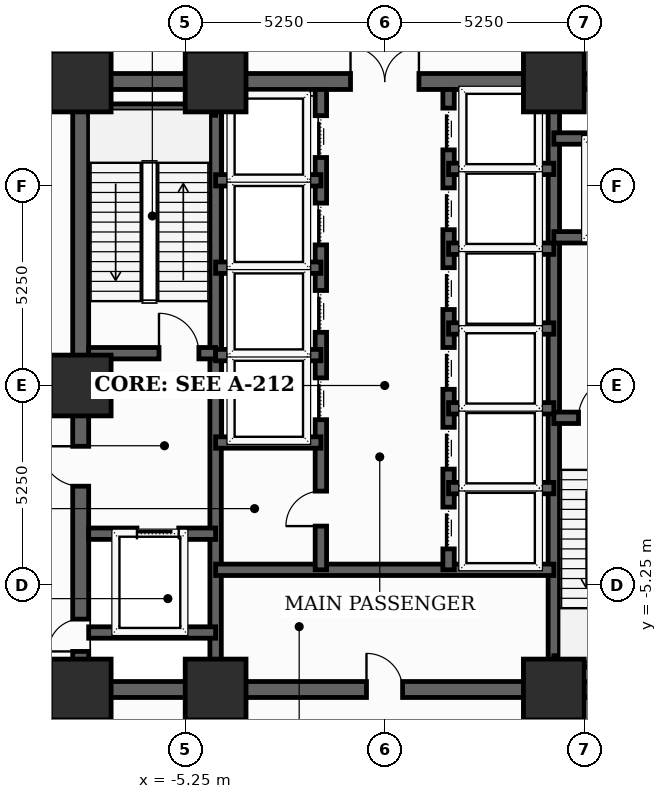
"""IFC4 building model, lengths in metres.
Left out: names, types, materials, properties, quantities, classifications, styles, units other than length and angle.
Written with IfcOpenShell. Run it as: python <this file> out.ifc"""

import sys

from ifc_helpers import new_model, si_unit, direction, frame, frame_2d, origin, origin_2d, place, context, subcontext, project, spatial, rectangle, extrude, element, fill, save


model = new_model("IFC4")
c1 = context("Model", 3, precision=1e-05, world=origin(), true_north=direction((0.0, 1.0)))
c2 = subcontext(c1, "Body", "Model", "MODEL_VIEW")
j1 = project(units=[si_unit("LENGTHUNIT", "METRE"), si_unit("PLANEANGLEUNIT", "RADIAN")], contexts=[c1])
p1 = place(None, origin())
s1 = spatial("IfcSite", under=j1, at=p1, CompositionType="ELEMENT")
p2 = place(p1, origin())
s2 = spatial("IfcBuilding", under=s1, at=p2, CompositionType="ELEMENT")
p3 = place(p2, origin())
s3 = spatial("IfcBuildingStorey", under=s2, at=p3, CompositionType="ELEMENT", Elevation=0.0)
for number, where, z_axis, x_axis in (
    (1, (-8.0, -8.0, 0.0), (0.0, 0.0, 1.0), (1.0, 0.0, 0.0)),
    (2, (-4.45, -8.0, 0.0), (0.0, 0.0, 1.0), (1.0, 0.0, 0.0)),
    (3, (4.45, -8.0, 0.0), (0.0, 0.0, 1.0), (1.0, 0.0, 0.0)),
    (4, (4.45, 8.0, 0.0), (0.0, 0.0, 1.0), (1.0, 0.0, 0.0)),
    (5, (-4.45, 8.0, 0.0), (0.0, 0.0, 1.0), (1.0, 0.0, 0.0)),
    (6, (-8.0, 8.0, 0.0), (0.0, 0.0, 1.0), (1.0, 0.0, 0.0)),
    (7, (-8.0, 0.0, 0.0), (0.0, 0.0, 1.0), (1.0, 0.0, 0.0)),
):
    element("IfcColumn", number, at=place(p3, frame(where, z_axis=z_axis, x_axis=x_axis)), inside=s3, PredefinedType="COLUMN", context=c2, shape_type="SweptSolid", body=[
        extrude(rectangle(XDim=1.6, YDim=1.6, at=origin_2d()), origin(), (0.0, 0.0, 1.0), 5.2),
    ])
p4 = place(p3, frame((-8.0, -8.0, 0.0), z_axis=(0.0, 0.0, 1.0), x_axis=(0.0, 1.0, 0.0)))
e8 = element("IfcWall", 8, at=p4, inside=s3, PredefinedType="SHEAR", context=c2, shape_type="SweptSolid", body=[
    extrude(rectangle(XDim=16.0, YDim=0.42, at=frame_2d((8.0, 0.0))), origin(), (0.0, 0.0, 1.0), 4.95),
])
p5 = place(p4, frame((1.002, 0.0, 0.0)))
e9 = element("IfcOpeningElement", 9, at=p5, cuts=e8, PredefinedType="OPENING", context=c2, shape_type="SweptSolid", body=[
    extrude(rectangle(XDim=0.85, YDim=2.02, at=frame_2d((0.425, 1.01))), frame((0.0, 0.22, 0.0), z_axis=(0.0, -1.0, 0.0), x_axis=(1.0, 0.0, 0.0)), (0.0, 0.0, 1.0), 0.44),
])
p6 = place(p4, frame((5.35, 0.0, 0.0)))
e10 = element("IfcOpeningElement", 10, at=p6, cuts=e8, PredefinedType="OPENING", context=c2, shape_type="SweptSolid", body=[
    extrude(rectangle(XDim=1.05, YDim=2.15, at=frame_2d((0.525, 1.075))), frame((0.0, 0.22, 0.0), z_axis=(0.0, -1.0, 0.0), x_axis=(1.0, 0.0, 0.0)), (0.0, 0.0, 1.0), 0.44),
])
p7 = place(p3, frame((-8.0, -8.0, 0.0), z_axis=(0.0, 0.0, 1.0), x_axis=(1.0, 0.0, 0.0)))
e11 = element("IfcWall", 11, at=p7, inside=s3, PredefinedType="SHEAR", context=c2, shape_type="SweptSolid", body=[
    extrude(rectangle(XDim=16.0, YDim=0.42, at=frame_2d((8.0, 0.0))), origin(), (0.0, 0.0, 1.0), 4.95),
])
p8 = place(p7, frame((7.52, 0.0, 0.0)))
e12 = element("IfcOpeningElement", 12, at=p8, cuts=e11, PredefinedType="OPENING", context=c2, shape_type="SweptSolid", body=[
    extrude(rectangle(XDim=0.95, YDim=2.1, at=frame_2d((0.475, 1.05))), frame((0.0, 0.22, 0.0), z_axis=(0.0, -1.0, 0.0), x_axis=(1.0, 0.0, 0.0)), (0.0, 0.0, 1.0), 0.44),
])
p9 = place(p3, frame((-8.0, 8.0, 0.0), z_axis=(0.0, 0.0, 1.0), x_axis=(1.0, 0.0, 0.0)))
e13 = element("IfcWall", 13, at=p9, inside=s3, PredefinedType="SHEAR", context=c2, shape_type="SweptSolid", body=[
    extrude(rectangle(XDim=16.0, YDim=0.42, at=frame_2d((8.0, 0.0))), origin(), (0.0, 0.0, 1.0), 4.95),
])
p10 = place(p9, frame((7.1, 0.0, 0.0)))
e14 = element("IfcOpeningElement", 14, at=p10, cuts=e13, PredefinedType="OPENING", context=c2, shape_type="SweptSolid", body=[
    extrude(rectangle(XDim=1.8, YDim=2.15, at=frame_2d((0.9, 1.075))), frame((0.0, 0.22, 0.0), z_axis=(0.0, -1.0, 0.0), x_axis=(1.0, 0.0, 0.0)), (0.0, 0.0, 1.0), 0.44),
])
for number, where, z_axis, x_axis in (
    (15, (-4.45, -7.79, 0.0), (0.0, 0.0, 1.0), (0.0, 1.0, 0.0)),
    (16, (4.45, -7.79, 0.0), (0.0, 0.0, 1.0), (0.0, 1.0, 0.0)),
):
    element("IfcWall", number, at=place(p3, frame(where, z_axis=z_axis, x_axis=x_axis)), inside=s3, PredefinedType="SHEAR", context=c2, shape_type="SweptSolid", body=[
        extrude(rectangle(XDim=15.58, YDim=0.3, at=frame_2d((7.79, 0.0))), origin(), (0.0, 0.0, 1.0), 4.95),
    ])
p11 = place(p3, frame((-7.79, 0.85, 0.0), z_axis=(0.0, 0.0, 1.0), x_axis=(1.0, 0.0, 0.0)))
e17 = element("IfcWall", 17, at=p11, inside=s3, PredefinedType="SHEAR", context=c2, shape_type="SweptSolid", body=[
    extrude(rectangle(XDim=3.34, YDim=0.3, at=frame_2d((1.67, 0.0))), origin(), (0.0, 0.0, 1.0), 4.95),
])
p12 = place(p11, frame((1.85, 0.0, 0.0)))
e18 = element("IfcOpeningElement", 18, at=p12, cuts=e17, PredefinedType="OPENING", context=c2, shape_type="SweptSolid", body=[
    extrude(rectangle(XDim=1.05, YDim=2.15, at=frame_2d((0.525, 1.075))), frame((0.0, 0.16, 0.0), z_axis=(0.0, -1.0, 0.0), x_axis=(1.0, 0.0, 0.0)), (0.0, 0.0, 1.0), 0.32),
])
p13 = place(p3, frame((-7.79, 7.26, 0.0), z_axis=(0.0, 0.0, 1.0), x_axis=(1.0, 0.0, 0.0)))
e19 = element("IfcWall", 19, at=p13, inside=s3, PredefinedType="SHEAR", context=c2, shape_type="SweptSolid", body=[
    extrude(rectangle(XDim=3.34, YDim=0.3, at=frame_2d((1.67, 0.0))), origin(), (0.0, 0.0, 1.0), 4.95),
])
p14 = place(p3, frame((4.45, -0.85, 0.0), z_axis=(0.0, 0.0, 1.0), x_axis=(1.0, 0.0, 0.0)))
e20 = element("IfcWall", 20, at=p14, inside=s3, PredefinedType="SHEAR", context=c2, shape_type="SweptSolid", body=[
    extrude(rectangle(XDim=3.34, YDim=0.3, at=frame_2d((1.67, 0.0))), origin(), (0.0, 0.0, 1.0), 4.95),
])
p15 = place(p14, frame((0.65, 0.0, 0.0)))
e21 = element("IfcOpeningElement", 21, at=p15, cuts=e20, PredefinedType="OPENING", context=c2, shape_type="SweptSolid", body=[
    extrude(rectangle(XDim=1.05, YDim=2.15, at=frame_2d((0.525, 1.075))), frame((0.0, 0.16, 0.0), z_axis=(0.0, -1.0, 0.0), x_axis=(1.0, 0.0, 0.0)), (0.0, 0.0, 1.0), 0.32),
])
p16 = place(p3, frame((4.45, -7.26, 0.0), z_axis=(0.0, 0.0, 1.0), x_axis=(1.0, 0.0, 0.0)))
e22 = element("IfcWall", 22, at=p16, inside=s3, PredefinedType="SHEAR", context=c2, shape_type="SweptSolid", body=[
    extrude(rectangle(XDim=3.55, YDim=0.3, at=frame_2d((1.775, 0.0))), origin(), (0.0, 0.0, 1.0), 4.95),
])
p17 = place(p3, frame((-7.79, -3.9, 0.0), z_axis=(0.0, 0.0, 1.0), x_axis=(1.0, 0.0, 0.0)))
e23 = element("IfcWall", 23, at=p17, inside=s3, PredefinedType="SHEAR", context=c2, shape_type="SweptSolid", body=[
    extrude(rectangle(XDim=3.34, YDim=0.3, at=frame_2d((1.67, 0.0))), origin(), (0.0, 0.0, 1.0), 4.95),
])
p18 = place(p17, frame((1.27, 0.0, 0.0)))
e24 = element("IfcOpeningElement", 24, at=p18, cuts=e23, PredefinedType="OPENING", context=c2, shape_type="SweptSolid", body=[
    extrude(rectangle(XDim=1.1, YDim=2.1, at=frame_2d((0.55, 1.05))), frame((0.0, 0.16, 0.0), z_axis=(0.0, -1.0, 0.0), x_axis=(1.0, 0.0, 0.0)), (0.0, 0.0, 1.0), 0.32),
])
p19 = place(p3, frame((-7.79, -6.5, 0.0), z_axis=(0.0, 0.0, 1.0), x_axis=(1.0, 0.0, 0.0)))
e25 = element("IfcWall", 25, at=p19, inside=s3, PredefinedType="SHEAR", context=c2, shape_type="SweptSolid", body=[
    extrude(rectangle(XDim=3.34, YDim=0.3, at=frame_2d((1.67, 0.0))), origin(), (0.0, 0.0, 1.0), 4.95),
])
p20 = place(p3, frame((4.45, 3.9, 0.0), z_axis=(0.0, 0.0, 1.0), x_axis=(1.0, 0.0, 0.0)))
e26 = element("IfcWall", 26, at=p20, inside=s3, PredefinedType="SHEAR", context=c2, shape_type="SweptSolid", body=[
    extrude(rectangle(XDim=3.34, YDim=0.3, at=frame_2d((1.67, 0.0))), origin(), (0.0, 0.0, 1.0), 4.95),
])
p21 = place(p20, frame((1.18, 0.0, 0.0)))
e27 = element("IfcOpeningElement", 27, at=p21, cuts=e26, PredefinedType="OPENING", context=c2, shape_type="SweptSolid", body=[
    extrude(rectangle(XDim=1.1, YDim=2.1, at=frame_2d((0.55, 1.05))), frame((0.0, 0.16, 0.0), z_axis=(0.0, -1.0, 0.0), x_axis=(1.0, 0.0, 0.0)), (0.0, 0.0, 1.0), 0.32),
])
p22 = place(p3, frame((4.45, 6.5, 0.0), z_axis=(0.0, 0.0, 1.0), x_axis=(1.0, 0.0, 0.0)))
e28 = element("IfcWall", 28, at=p22, inside=s3, PredefinedType="SHEAR", context=c2, shape_type="SweptSolid", body=[
    extrude(rectangle(XDim=3.34, YDim=0.3, at=frame_2d((1.67, 0.0))), origin(), (0.0, 0.0, 1.0), 4.95),
])
p23 = place(p3, frame((-4.45, -4.85, 0.0), z_axis=(0.0, 0.0, 1.0), x_axis=(1.0, 0.0, 0.0)))
e29 = element("IfcWall", 29, at=p23, inside=s3, PredefinedType="SHEAR", context=c2, shape_type="SweptSolid", body=[
    extrude(rectangle(XDim=8.9, YDim=0.3, at=frame_2d((4.45, 0.0))), origin(), (0.0, 0.0, 1.0), 4.95),
])
p24 = place(p3, frame((-1.68, -4.85, 0.0), z_axis=(0.0, 0.0, 1.0), x_axis=(0.0, 1.0, 0.0)))
e30 = element("IfcWall", 30, at=p24, inside=s3, PredefinedType="SHEAR", context=c2, shape_type="SweptSolid", body=[
    extrude(rectangle(XDim=12.64, YDim=0.3, at=frame_2d((6.32, 0.0))), origin(), (0.0, 0.0, 1.0), 4.95),
])
p25 = place(p24, frame((3.95, 0.0, 0.0)))
e31 = element("IfcOpeningElement", 31, at=p25, cuts=e30, PredefinedType="OPENING", context=c2, shape_type="SweptSolid", body=[
    extrude(rectangle(XDim=1.1, YDim=2.1, at=frame_2d((0.55, 1.05))), frame((0.0, 0.16, 0.0), z_axis=(0.0, -1.0, 0.0), x_axis=(1.0, 0.0, 0.0)), (0.0, 0.0, 1.0), 0.32),
])
p26 = place(p24, frame((6.25, 0.0, 0.0)))
e32 = element("IfcOpeningElement", 32, at=p26, cuts=e30, PredefinedType="OPENING", context=c2, shape_type="SweptSolid", body=[
    extrude(rectangle(XDim=1.1, YDim=2.1, at=frame_2d((0.55, 1.05))), frame((0.0, 0.16, 0.0), z_axis=(0.0, -1.0, 0.0), x_axis=(1.0, 0.0, 0.0)), (0.0, 0.0, 1.0), 0.32),
])
p27 = place(p24, frame((8.55, 0.0, 0.0)))
e33 = element("IfcOpeningElement", 33, at=p27, cuts=e30, PredefinedType="OPENING", context=c2, shape_type="SweptSolid", body=[
    extrude(rectangle(XDim=1.1, YDim=2.1, at=frame_2d((0.55, 1.05))), frame((0.0, 0.16, 0.0), z_axis=(0.0, -1.0, 0.0), x_axis=(1.0, 0.0, 0.0)), (0.0, 0.0, 1.0), 0.32),
])
p28 = place(p24, frame((10.85, 0.0, 0.0)))
e34 = element("IfcOpeningElement", 34, at=p28, cuts=e30, PredefinedType="OPENING", context=c2, shape_type="SweptSolid", body=[
    extrude(rectangle(XDim=1.1, YDim=2.1, at=frame_2d((0.55, 1.05))), frame((0.0, 0.16, 0.0), z_axis=(0.0, -1.0, 0.0), x_axis=(1.0, 0.0, 0.0)), (0.0, 0.0, 1.0), 0.32),
])
p29 = place(p24, frame((1.15, 0.0, 0.0)))
e35 = element("IfcOpeningElement", 35, at=p29, cuts=e30, PredefinedType="OPENING", context=c2, shape_type="SweptSolid", body=[
    extrude(rectangle(XDim=0.92, YDim=2.1, at=frame_2d((0.46, 1.05))), frame((0.0, 0.16, 0.0), z_axis=(0.0, -1.0, 0.0), x_axis=(1.0, 0.0, 0.0)), (0.0, 0.0, 1.0), 0.32),
])
p30 = place(p3, frame((1.68, -4.85, 0.0), z_axis=(0.0, 0.0, 1.0), x_axis=(0.0, 1.0, 0.0)))
e36 = element("IfcWall", 36, at=p30, inside=s3, PredefinedType="SHEAR", context=c2, shape_type="SweptSolid", body=[
    extrude(rectangle(XDim=12.64, YDim=0.3, at=frame_2d((6.32, 0.0))), origin(), (0.0, 0.0, 1.0), 4.95),
])
p31 = place(p30, frame((0.55, 0.0, 0.0)))
e37 = element("IfcOpeningElement", 37, at=p31, cuts=e36, PredefinedType="OPENING", context=c2, shape_type="SweptSolid", body=[
    extrude(rectangle(XDim=1.1, YDim=2.1, at=frame_2d((0.55, 1.05))), frame((0.0, 0.16, 0.0), z_axis=(0.0, -1.0, 0.0), x_axis=(1.0, 0.0, 0.0)), (0.0, 0.0, 1.0), 0.32),
])
p32 = place(p30, frame((2.65, 0.0, 0.0)))
e38 = element("IfcOpeningElement", 38, at=p32, cuts=e36, PredefinedType="OPENING", context=c2, shape_type="SweptSolid", body=[
    extrude(rectangle(XDim=1.1, YDim=2.1, at=frame_2d((0.55, 1.05))), frame((0.0, 0.16, 0.0), z_axis=(0.0, -1.0, 0.0), x_axis=(1.0, 0.0, 0.0)), (0.0, 0.0, 1.0), 0.32),
])
p33 = place(p30, frame((4.75, 0.0, 0.0)))
e39 = element("IfcOpeningElement", 39, at=p33, cuts=e36, PredefinedType="OPENING", context=c2, shape_type="SweptSolid", body=[
    extrude(rectangle(XDim=1.1, YDim=2.1, at=frame_2d((0.55, 1.05))), frame((0.0, 0.16, 0.0), z_axis=(0.0, -1.0, 0.0), x_axis=(1.0, 0.0, 0.0)), (0.0, 0.0, 1.0), 0.32),
])
p34 = place(p30, frame((6.85, 0.0, 0.0)))
e40 = element("IfcOpeningElement", 40, at=p34, cuts=e36, PredefinedType="OPENING", context=c2, shape_type="SweptSolid", body=[
    extrude(rectangle(XDim=1.1, YDim=2.1, at=frame_2d((0.55, 1.05))), frame((0.0, 0.16, 0.0), z_axis=(0.0, -1.0, 0.0), x_axis=(1.0, 0.0, 0.0)), (0.0, 0.0, 1.0), 0.32),
])
p35 = place(p30, frame((8.95, 0.0, 0.0)))
e41 = element("IfcOpeningElement", 41, at=p35, cuts=e36, PredefinedType="OPENING", context=c2, shape_type="SweptSolid", body=[
    extrude(rectangle(XDim=1.1, YDim=2.1, at=frame_2d((0.55, 1.05))), frame((0.0, 0.16, 0.0), z_axis=(0.0, -1.0, 0.0), x_axis=(1.0, 0.0, 0.0)), (0.0, 0.0, 1.0), 0.32),
])
p36 = place(p30, frame((11.05, 0.0, 0.0)))
e42 = element("IfcOpeningElement", 42, at=p36, cuts=e36, PredefinedType="OPENING", context=c2, shape_type="SweptSolid", body=[
    extrude(rectangle(XDim=1.1, YDim=2.1, at=frame_2d((0.55, 1.05))), frame((0.0, 0.16, 0.0), z_axis=(0.0, -1.0, 0.0), x_axis=(1.0, 0.0, 0.0)), (0.0, 0.0, 1.0), 0.32),
])
for number, where, z_axis, x_axis in (
    (43, (-4.45, -1.5, 0.0), (0.0, 0.0, 1.0), (1.0, 0.0, 0.0)),
    (44, (-4.45, 0.8, 0.0), (0.0, 0.0, 1.0), (1.0, 0.0, 0.0)),
    (45, (-4.45, 3.1, 0.0), (0.0, 0.0, 1.0), (1.0, 0.0, 0.0)),
    (46, (-4.45, 5.4, 0.0), (0.0, 0.0, 1.0), (1.0, 0.0, 0.0)),
    (47, (1.68, 1.5, 0.0), (0.0, 0.0, 1.0), (1.0, 0.0, 0.0)),
    (48, (1.68, 3.6, 0.0), (0.0, 0.0, 1.0), (1.0, 0.0, 0.0)),
    (49, (1.68, 5.7, 0.0), (0.0, 0.0, 1.0), (1.0, 0.0, 0.0)),
    (50, (1.68, -2.7, 0.0), (0.0, 0.0, 1.0), (1.0, 0.0, 0.0)),
    (51, (1.68, -0.6, 0.0), (0.0, 0.0, 1.0), (1.0, 0.0, 0.0)),
):
    element("IfcWall", number, at=place(p3, frame(where, z_axis=z_axis, x_axis=x_axis)), inside=s3, PredefinedType="SHEAR", context=c2, shape_type="SweptSolid", body=[
        extrude(rectangle(XDim=2.77, YDim=0.3, at=frame_2d((1.385, 0.0))), origin(), (0.0, 0.0, 1.0), 4.95),
    ])
p37 = place(p5, origin())
e52 = element("IfcDoor", 52, at=p37, inside=s3, OperationType="SINGLE_SWING_LEFT", PredefinedType="TRAPDOOR", context=c2, shape_type="SweptSolid", body=[
    extrude(rectangle(XDim=0.85, YDim=2.02, at=frame_2d((0.425, 1.01))), frame((0.0, 0.025, 0.0), z_axis=(0.0, -1.0, 0.0), x_axis=(1.0, 0.0, 0.0)), (0.0, 0.0, 1.0), 0.05),
])
fill(e9, e52)
p38 = place(p6, origin())
e53 = element("IfcDoor", 53, at=p38, inside=s3, OperationType="SINGLE_SWING_RIGHT", PredefinedType="DOOR", context=c2, shape_type="SweptSolid", body=[
    extrude(rectangle(XDim=1.05, YDim=2.15, at=frame_2d((0.525, 1.075))), frame((0.0, 0.025, 0.0), z_axis=(0.0, -1.0, 0.0), x_axis=(1.0, 0.0, 0.0)), (0.0, 0.0, 1.0), 0.05),
])
fill(e10, e53)
p39 = place(p8, origin())
e54 = element("IfcDoor", 54, at=p39, inside=s3, OperationType="SINGLE_SWING_LEFT", PredefinedType="DOOR", context=c2, shape_type="SweptSolid", body=[
    extrude(rectangle(XDim=0.95, YDim=2.1, at=frame_2d((0.475, 1.05))), frame((0.0, 0.025, 0.0), z_axis=(0.0, -1.0, 0.0), x_axis=(1.0, 0.0, 0.0)), (0.0, 0.0, 1.0), 0.05),
])
fill(e12, e54)
p40 = place(p10, origin())
e55 = element("IfcDoor", 55, at=p40, inside=s3, OperationType="DOUBLE_DOOR_SINGLE_SWING", PredefinedType="DOOR", context=c2, shape_type="SweptSolid", body=[
    extrude(rectangle(XDim=1.8, YDim=2.15, at=frame_2d((0.9, 1.075))), frame((0.0, 0.025, 0.0), z_axis=(0.0, -1.0, 0.0), x_axis=(1.0, 0.0, 0.0)), (0.0, 0.0, 1.0), 0.05),
])
fill(e14, e55)
p41 = place(p12, origin())
e56 = element("IfcDoor", 56, at=p41, inside=s3, OperationType="SINGLE_SWING_LEFT", PredefinedType="DOOR", context=c2, shape_type="SweptSolid", body=[
    extrude(rectangle(XDim=1.05, YDim=2.15, at=frame_2d((0.525, 1.075))), frame((0.0, 0.025, 0.0), z_axis=(0.0, -1.0, 0.0), x_axis=(1.0, 0.0, 0.0)), (0.0, 0.0, 1.0), 0.05),
])
fill(e18, e56)
p42 = place(p15, origin())
e57 = element("IfcDoor", 57, at=p42, inside=s3, OperationType="SINGLE_SWING_RIGHT", PredefinedType="DOOR", context=c2, shape_type="SweptSolid", body=[
    extrude(rectangle(XDim=1.05, YDim=2.15, at=frame_2d((0.525, 1.075))), frame((0.0, 0.025, 0.0), z_axis=(0.0, -1.0, 0.0), x_axis=(1.0, 0.0, 0.0)), (0.0, 0.0, 1.0), 0.05),
])
fill(e21, e57)
p43 = place(p18, origin())
e58 = element("IfcDoor", 58, at=p43, inside=s3, OperationType="SLIDING_TO_LEFT", PredefinedType="DOOR", context=c2, shape_type="SweptSolid", body=[
    extrude(rectangle(XDim=1.1, YDim=2.1, at=frame_2d((0.55, 1.05))), frame((0.0, 0.025, 0.0), z_axis=(0.0, -1.0, 0.0), x_axis=(1.0, 0.0, 0.0)), (0.0, 0.0, 1.0), 0.05),
])
fill(e24, e58)
p44 = place(p25, origin())
e59 = element("IfcDoor", 59, at=p44, inside=s3, OperationType="SLIDING_TO_LEFT", PredefinedType="DOOR", context=c2, shape_type="SweptSolid", body=[
    extrude(rectangle(XDim=1.1, YDim=2.1, at=frame_2d((0.55, 1.05))), frame((0.0, 0.025, 0.0), z_axis=(0.0, -1.0, 0.0), x_axis=(1.0, 0.0, 0.0)), (0.0, 0.0, 1.0), 0.05),
])
fill(e31, e59)
p45 = place(p26, origin())
e60 = element("IfcDoor", 60, at=p45, inside=s3, OperationType="SLIDING_TO_LEFT", PredefinedType="DOOR", context=c2, shape_type="SweptSolid", body=[
    extrude(rectangle(XDim=1.1, YDim=2.1, at=frame_2d((0.55, 1.05))), frame((0.0, 0.025, 0.0), z_axis=(0.0, -1.0, 0.0), x_axis=(1.0, 0.0, 0.0)), (0.0, 0.0, 1.0), 0.05),
])
fill(e32, e60)
p46 = place(p27, origin())
e61 = element("IfcDoor", 61, at=p46, inside=s3, OperationType="SLIDING_TO_LEFT", PredefinedType="DOOR", context=c2, shape_type="SweptSolid", body=[
    extrude(rectangle(XDim=1.1, YDim=2.1, at=frame_2d((0.55, 1.05))), frame((0.0, 0.025, 0.0), z_axis=(0.0, -1.0, 0.0), x_axis=(1.0, 0.0, 0.0)), (0.0, 0.0, 1.0), 0.05),
])
fill(e33, e61)
p47 = place(p28, origin())
e62 = element("IfcDoor", 62, at=p47, inside=s3, OperationType="SLIDING_TO_LEFT", PredefinedType="DOOR", context=c2, shape_type="SweptSolid", body=[
    extrude(rectangle(XDim=1.1, YDim=2.1, at=frame_2d((0.55, 1.05))), frame((0.0, 0.025, 0.0), z_axis=(0.0, -1.0, 0.0), x_axis=(1.0, 0.0, 0.0)), (0.0, 0.0, 1.0), 0.05),
])
fill(e34, e62)
p48 = place(p29, origin())
e63 = element("IfcDoor", 63, at=p48, inside=s3, OperationType="SINGLE_SWING_LEFT", PredefinedType="DOOR", context=c2, shape_type="SweptSolid", body=[
    extrude(rectangle(XDim=0.92, YDim=2.1, at=frame_2d((0.46, 1.05))), frame((0.0, 0.025, 0.0), z_axis=(0.0, -1.0, 0.0), x_axis=(1.0, 0.0, 0.0)), (0.0, 0.0, 1.0), 0.05),
])
fill(e35, e63)
p49 = place(p31, origin())
e64 = element("IfcDoor", 64, at=p49, inside=s3, OperationType="SLIDING_TO_LEFT", PredefinedType="DOOR", context=c2, shape_type="SweptSolid", body=[
    extrude(rectangle(XDim=1.1, YDim=2.1, at=frame_2d((0.55, 1.05))), frame((0.0, 0.025, 0.0), z_axis=(0.0, -1.0, 0.0), x_axis=(1.0, 0.0, 0.0)), (0.0, 0.0, 1.0), 0.05),
])
fill(e37, e64)
p50 = place(p32, origin())
e65 = element("IfcDoor", 65, at=p50, inside=s3, OperationType="SLIDING_TO_LEFT", PredefinedType="DOOR", context=c2, shape_type="SweptSolid", body=[
    extrude(rectangle(XDim=1.1, YDim=2.1, at=frame_2d((0.55, 1.05))), frame((0.0, 0.025, 0.0), z_axis=(0.0, -1.0, 0.0), x_axis=(1.0, 0.0, 0.0)), (0.0, 0.0, 1.0), 0.05),
])
fill(e38, e65)
p51 = place(p33, origin())
e66 = element("IfcDoor", 66, at=p51, inside=s3, OperationType="SLIDING_TO_LEFT", PredefinedType="DOOR", context=c2, shape_type="SweptSolid", body=[
    extrude(rectangle(XDim=1.1, YDim=2.1, at=frame_2d((0.55, 1.05))), frame((0.0, 0.025, 0.0), z_axis=(0.0, -1.0, 0.0), x_axis=(1.0, 0.0, 0.0)), (0.0, 0.0, 1.0), 0.05),
])
fill(e39, e66)
p52 = place(p34, origin())
e67 = element("IfcDoor", 67, at=p52, inside=s3, OperationType="SLIDING_TO_LEFT", PredefinedType="DOOR", context=c2, shape_type="SweptSolid", body=[
    extrude(rectangle(XDim=1.1, YDim=2.1, at=frame_2d((0.55, 1.05))), frame((0.0, 0.025, 0.0), z_axis=(0.0, -1.0, 0.0), x_axis=(1.0, 0.0, 0.0)), (0.0, 0.0, 1.0), 0.05),
])
fill(e40, e67)
p53 = place(p35, origin())
e68 = element("IfcDoor", 68, at=p53, inside=s3, OperationType="SLIDING_TO_LEFT", PredefinedType="DOOR", context=c2, shape_type="SweptSolid", body=[
    extrude(rectangle(XDim=1.1, YDim=2.1, at=frame_2d((0.55, 1.05))), frame((0.0, 0.025, 0.0), z_axis=(0.0, -1.0, 0.0), x_axis=(1.0, 0.0, 0.0)), (0.0, 0.0, 1.0), 0.05),
])
fill(e41, e68)
p54 = place(p36, origin())
e69 = element("IfcDoor", 69, at=p54, inside=s3, OperationType="SLIDING_TO_LEFT", PredefinedType="DOOR", context=c2, shape_type="SweptSolid", body=[
    extrude(rectangle(XDim=1.1, YDim=2.1, at=frame_2d((0.55, 1.05))), frame((0.0, 0.025, 0.0), z_axis=(0.0, -1.0, 0.0), x_axis=(1.0, 0.0, 0.0)), (0.0, 0.0, 1.0), 0.05),
])
fill(e42, e69)
save(model, sys.argv[1])
